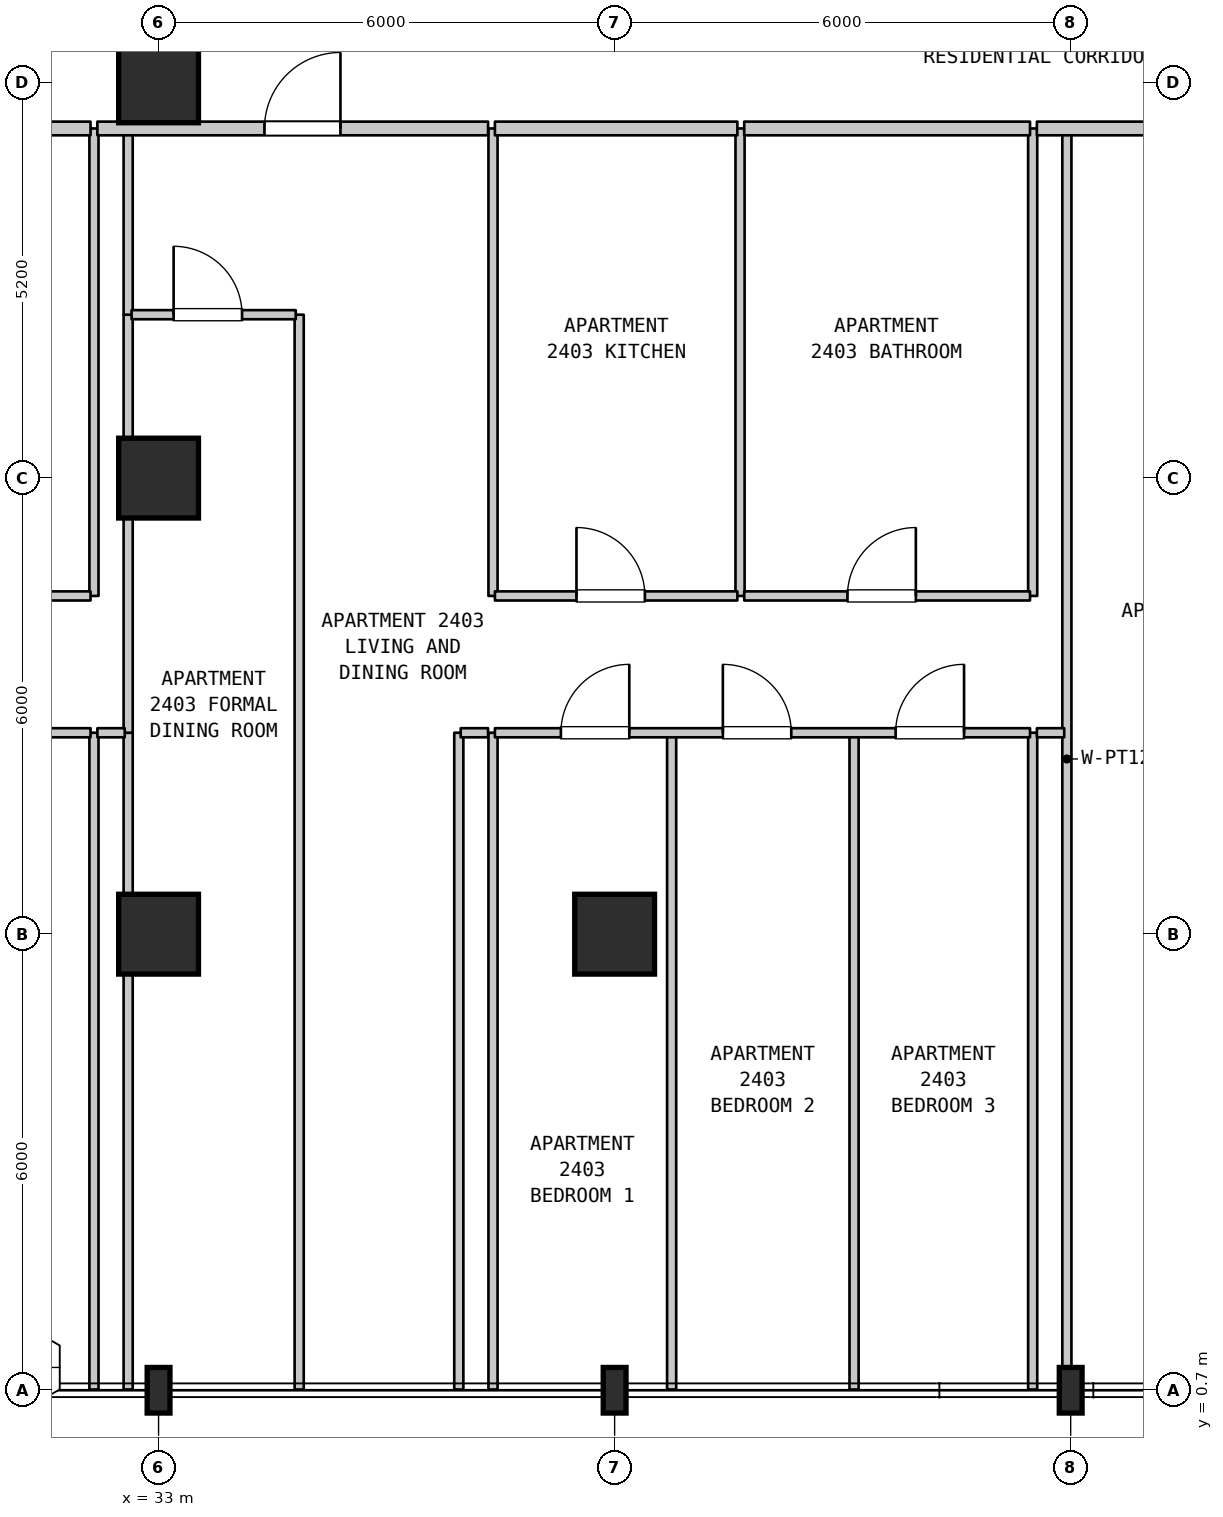
"""IFC4 building model, lengths in metres.
Left out: names, types, materials, properties, quantities, classifications, styles, units other than length and angle.
Written with IfcOpenShell. Run it as: python <this file> out.ifc"""

import sys

from ifc_helpers import new_model, si_unit, direction, frame, frame_2d, origin, origin_2d, place, context, subcontext, project, spatial, rectangle, i_section, extrude, element, fill, save


model = new_model("IFC4")
c1 = context("Model", 3, precision=1e-05, world=origin(), true_north=direction((0.0, 1.0)))
c2 = subcontext(c1, "Body", "Model", "MODEL_VIEW")
j1 = project(units=[si_unit("LENGTHUNIT", "METRE"), si_unit("PLANEANGLEUNIT", "RADIAN")], contexts=[c1])
p1 = place(None, origin())
s1 = spatial("IfcSite", under=j1, at=p1, CompositionType="ELEMENT")
p2 = place(p1, origin())
s2 = spatial("IfcBuilding", under=s1, at=p2, CompositionType="ELEMENT")
p3 = place(p2, frame((0.0, 0.0, 102.0)))
s3 = spatial("IfcBuildingStorey", under=s2, at=p3, CompositionType="ELEMENT", Elevation=102.0)
p4 = place(p3, frame((33.0, 0.7, 0.0), z_axis=(0.0, 0.0, 1.0), x_axis=(1.0, 0.0, 0.0)))
e1 = element("IfcColumn", 1, at=p4, inside=s3, PredefinedType="COLUMN", context=c2, shape_type="SweptSolid", body=[
    extrude(i_section(OverallWidth=0.3, OverallDepth=0.6, WebThickness=0.015, FlangeThickness=0.03, FilletRadius=0.027, at=origin_2d()), origin(), (0.0, 0.0, 1.0), 3.7),
])
for number, where, z_axis, x_axis in (
    (2, (33.0, 6.7, 0.0), (0.0, 0.0, 1.0), (1.0, 0.0, 0.0)),
    (3, (33.0, 12.7, 0.0), (0.0, 0.0, 1.0), (1.0, 0.0, 0.0)),
    (4, (33.0, 17.9, 0.0), (0.0, 0.0, 1.0), (1.0, 0.0, 0.0)),
):
    element("IfcColumn", number, at=place(p3, frame(where, z_axis=z_axis, x_axis=x_axis)), inside=s3, PredefinedType="COLUMN", context=c2, shape_type="SweptSolid", body=[
        extrude(rectangle(XDim=1.05, YDim=1.05, at=origin_2d()), origin(), (0.0, 0.0, 1.0), 3.7),
    ])
p5 = place(p3, frame((39.0, 0.7, 0.0), z_axis=(0.0, 0.0, 1.0), x_axis=(1.0, 0.0, 0.0)))
e5 = element("IfcColumn", 5, at=p5, inside=s3, PredefinedType="COLUMN", context=c2, shape_type="SweptSolid", body=[
    extrude(i_section(OverallWidth=0.3, OverallDepth=0.6, WebThickness=0.015, FlangeThickness=0.03, FilletRadius=0.027, at=origin_2d()), origin(), (0.0, 0.0, 1.0), 3.7),
])
p6 = place(p3, frame((39.0, 6.7, 0.0), z_axis=(0.0, 0.0, 1.0), x_axis=(1.0, 0.0, 0.0)))
e6 = element("IfcColumn", 6, at=p6, inside=s3, PredefinedType="COLUMN", context=c2, shape_type="SweptSolid", body=[
    extrude(rectangle(XDim=1.05, YDim=1.05, at=origin_2d()), origin(), (0.0, 0.0, 1.0), 3.7),
])
p7 = place(p3, frame((45.0, 0.7, 0.0), z_axis=(0.0, 0.0, 1.0), x_axis=(1.0, 0.0, 0.0)))
e7 = element("IfcColumn", 7, at=p7, inside=s3, PredefinedType="COLUMN", context=c2, shape_type="SweptSolid", body=[
    extrude(i_section(OverallWidth=0.3, OverallDepth=0.6, WebThickness=0.015, FlangeThickness=0.03, FilletRadius=0.027, at=origin_2d()), origin(), (0.0, 0.0, 1.0), 3.7),
])
p8 = place(p3, frame((32.15, 0.71, 0.0), z_axis=(0.0, 0.0, 1.0), x_axis=(0.0, 1.0, 0.0)))
e8 = element("IfcWall", 8, at=p8, inside=s3, PredefinedType="PARTITIONING", context=c2, shape_type="SweptSolid", body=[
    extrude(rectangle(XDim=8.64, YDim=0.12, at=frame_2d((4.32, 0.0))), origin(), (0.0, 0.0, 1.0), 3.385),
])
p9 = place(p3, frame((32.15, 11.15, 0.0), z_axis=(0.0, 0.0, 1.0), x_axis=(0.0, 1.0, 0.0)))
e9 = element("IfcWall", 9, at=p9, inside=s3, PredefinedType="PARTITIONING", context=c2, shape_type="SweptSolid", body=[
    extrude(rectangle(XDim=6.15, YDim=0.12, at=frame_2d((3.075, 0.0))), origin(), (0.0, 0.0, 1.0), 3.385),
])
p10 = place(p3, frame((32.6, 0.71, 0.0), z_axis=(0.0, 0.0, 1.0), x_axis=(0.0, 1.0, 0.0)))
e10 = element("IfcWall", 10, at=p10, inside=s3, PredefinedType="PARTITIONING", context=c2, shape_type="SweptSolid", body=[
    extrude(rectangle(XDim=8.64, YDim=0.12, at=frame_2d((4.32, 0.0))), origin(), (0.0, 0.0, 1.0), 3.385),
])
p11 = place(p3, frame((32.6, 9.35, 0.0), z_axis=(0.0, 0.0, 1.0), x_axis=(0.0, 1.0, 0.0)))
e11 = element("IfcWall", 11, at=p11, inside=s3, PredefinedType="PARTITIONING", context=c2, shape_type="SweptSolid", body=[
    extrude(rectangle(XDim=5.5, YDim=0.12, at=frame_2d((2.75, 0.0))), origin(), (0.0, 0.0, 1.0), 3.385),
])
p12 = place(p3, frame((32.6, 14.85, 0.0), z_axis=(0.0, 0.0, 1.0), x_axis=(0.0, 1.0, 0.0)))
e12 = element("IfcWall", 12, at=p12, inside=s3, PredefinedType="PARTITIONING", context=c2, shape_type="SweptSolid", body=[
    extrude(rectangle(XDim=2.45, YDim=0.12, at=frame_2d((1.225, 0.0))), origin(), (0.0, 0.0, 1.0), 3.385),
])
p13 = place(p3, frame((34.85, 0.71, 0.0), z_axis=(0.0, 0.0, 1.0), x_axis=(0.0, 1.0, 0.0)))
e13 = element("IfcWall", 13, at=p13, inside=s3, PredefinedType="PARTITIONING", context=c2, shape_type="SweptSolid", body=[
    extrude(rectangle(XDim=14.14, YDim=0.12, at=frame_2d((7.07, 0.0))), origin(), (0.0, 0.0, 1.0), 3.385),
])
for number, where, z_axis, x_axis in (
    (14, (36.95, 0.71, 0.0), (0.0, 0.0, 1.0), (0.0, 1.0, 0.0)),
    (15, (37.4, 0.71, 0.0), (0.0, 0.0, 1.0), (0.0, 1.0, 0.0)),
):
    element("IfcWall", number, at=place(p3, frame(where, z_axis=z_axis, x_axis=x_axis)), inside=s3, PredefinedType="PARTITIONING", context=c2, shape_type="SweptSolid", body=[
        extrude(rectangle(XDim=8.64, YDim=0.12, at=frame_2d((4.32, 0.0))), origin(), (0.0, 0.0, 1.0), 3.385),
    ])
p14 = place(p3, frame((37.4, 11.15, 0.0), z_axis=(0.0, 0.0, 1.0), x_axis=(0.0, 1.0, 0.0)))
e16 = element("IfcWall", 16, at=p14, inside=s3, PredefinedType="PARTITIONING", context=c2, shape_type="SweptSolid", body=[
    extrude(rectangle(XDim=6.15, YDim=0.12, at=frame_2d((3.075, 0.0))), origin(), (0.0, 0.0, 1.0), 3.385),
])
p15 = place(p3, frame((39.75, 0.71, 0.0), z_axis=(0.0, 0.0, 1.0), x_axis=(0.0, 1.0, 0.0)))
e17 = element("IfcWall", 17, at=p15, inside=s3, PredefinedType="PARTITIONING", context=c2, shape_type="SweptSolid", body=[
    extrude(rectangle(XDim=8.64, YDim=0.12, at=frame_2d((4.32, 0.0))), origin(), (0.0, 0.0, 1.0), 3.385),
])
p16 = place(p3, frame((40.65, 11.15, 0.0), z_axis=(0.0, 0.0, 1.0), x_axis=(0.0, 1.0, 0.0)))
e18 = element("IfcWall", 18, at=p16, inside=s3, PredefinedType="PARTITIONING", context=c2, shape_type="SweptSolid", body=[
    extrude(rectangle(XDim=6.15, YDim=0.12, at=frame_2d((3.075, 0.0))), origin(), (0.0, 0.0, 1.0), 3.385),
])
for number, where, z_axis, x_axis in (
    (19, (42.15, 0.71, 0.0), (0.0, 0.0, 1.0), (0.0, 1.0, 0.0)),
    (20, (44.5, 0.71, 0.0), (0.0, 0.0, 1.0), (0.0, 1.0, 0.0)),
):
    element("IfcWall", number, at=place(p3, frame(where, z_axis=z_axis, x_axis=x_axis)), inside=s3, PredefinedType="PARTITIONING", context=c2, shape_type="SweptSolid", body=[
        extrude(rectangle(XDim=8.64, YDim=0.12, at=frame_2d((4.32, 0.0))), origin(), (0.0, 0.0, 1.0), 3.385),
    ])
p17 = place(p3, frame((44.5, 11.15, 0.0), z_axis=(0.0, 0.0, 1.0), x_axis=(0.0, 1.0, 0.0)))
e21 = element("IfcWall", 21, at=p17, inside=s3, PredefinedType="PARTITIONING", context=c2, shape_type="SweptSolid", body=[
    extrude(rectangle(XDim=6.15, YDim=0.12, at=frame_2d((3.075, 0.0))), origin(), (0.0, 0.0, 1.0), 3.385),
])
p18 = place(p3, frame((44.95, 0.71, 0.0), z_axis=(0.0, 0.0, 1.0), x_axis=(0.0, 1.0, 0.0)))
e22 = element("IfcWall", 22, at=p18, inside=s3, PredefinedType="PARTITIONING", context=c2, shape_type="SweptSolid", body=[
    extrude(rectangle(XDim=16.59, YDim=0.12, at=frame_2d((8.295, 0.0))), origin(), (0.0, 0.0, 1.0), 3.385),
])
p19 = place(p3, frame((25.375, 9.35, 0.0), z_axis=(0.0, 0.0, 1.0), x_axis=(1.0, 0.0, 0.0)))
e23 = element("IfcWall", 23, at=p19, inside=s3, PredefinedType="PARTITIONING", context=c2, shape_type="SweptSolid", body=[
    extrude(rectangle(XDim=6.73, YDim=0.12, at=frame_2d((3.365, 0.0))), origin(), (0.0, 0.0, 1.0), 3.385),
])
p20 = place(p19, frame((1.31, 0.0, 0.0)))
e24 = element("IfcOpeningElement", 24, at=p20, cuts=e23, PredefinedType="OPENING", context=c2, shape_type="SweptSolid", body=[
    extrude(rectangle(XDim=0.9, YDim=2.15, at=frame_2d((0.45, 1.075))), frame((0.0, 0.07, 0.0), z_axis=(0.0, -1.0, 0.0), x_axis=(1.0, 0.0, 0.0)), (0.0, 0.0, 1.0), 0.14),
])
p21 = place(p19, frame((4.37, 0.0, 0.0)))
e25 = element("IfcOpeningElement", 25, at=p21, cuts=e23, PredefinedType="OPENING", context=c2, shape_type="SweptSolid", body=[
    extrude(rectangle(XDim=0.9, YDim=2.15, at=frame_2d((0.45, 1.075))), frame((0.0, 0.07, 0.0), z_axis=(0.0, -1.0, 0.0), x_axis=(1.0, 0.0, 0.0)), (0.0, 0.0, 1.0), 0.14),
])
for number, where, z_axis, x_axis in (
    (26, (32.195, 9.35, 0.0), (0.0, 0.0, 1.0), (1.0, 0.0, 0.0)),
    (27, (36.975, 9.35, 0.0), (0.0, 0.0, 1.0), (1.0, 0.0, 0.0)),
):
    element("IfcWall", number, at=place(p3, frame(where, z_axis=z_axis, x_axis=x_axis)), inside=s3, PredefinedType="PARTITIONING", context=c2, shape_type="SweptSolid", body=[
        extrude(rectangle(XDim=0.36, YDim=0.12, at=frame_2d((0.18, 0.0))), origin(), (0.0, 0.0, 1.0), 3.385),
    ])
p22 = place(p3, frame((37.425, 9.35, 0.0), z_axis=(0.0, 0.0, 1.0), x_axis=(1.0, 0.0, 0.0)))
e28 = element("IfcWall", 28, at=p22, inside=s3, PredefinedType="PARTITIONING", context=c2, shape_type="SweptSolid", body=[
    extrude(rectangle(XDim=7.04, YDim=0.12, at=frame_2d((3.52, 0.0))), origin(), (0.0, 0.0, 1.0), 3.385),
])
p23 = place(p22, frame((0.868, 0.0, 0.0)))
e29 = element("IfcOpeningElement", 29, at=p23, cuts=e28, PredefinedType="OPENING", context=c2, shape_type="SweptSolid", body=[
    extrude(rectangle(XDim=0.9, YDim=2.15, at=frame_2d((0.45, 1.075))), frame((0.0, 0.07, 0.0), z_axis=(0.0, -1.0, 0.0), x_axis=(1.0, 0.0, 0.0)), (0.0, 0.0, 1.0), 0.14),
])
p24 = place(p22, frame((2.999, 0.0, 0.0)))
e30 = element("IfcOpeningElement", 30, at=p24, cuts=e28, PredefinedType="OPENING", context=c2, shape_type="SweptSolid", body=[
    extrude(rectangle(XDim=0.9, YDim=2.15, at=frame_2d((0.45, 1.075))), frame((0.0, 0.07, 0.0), z_axis=(0.0, -1.0, 0.0), x_axis=(1.0, 0.0, 0.0)), (0.0, 0.0, 1.0), 0.14),
])
p25 = place(p22, frame((5.272, 0.0, 0.0)))
e31 = element("IfcOpeningElement", 31, at=p25, cuts=e28, PredefinedType="OPENING", context=c2, shape_type="SweptSolid", body=[
    extrude(rectangle(XDim=0.9, YDim=2.15, at=frame_2d((0.45, 1.075))), frame((0.0, 0.07, 0.0), z_axis=(0.0, -1.0, 0.0), x_axis=(1.0, 0.0, 0.0)), (0.0, 0.0, 1.0), 0.14),
])
p26 = place(p3, frame((44.555, 9.35, 0.0), z_axis=(0.0, 0.0, 1.0), x_axis=(1.0, 0.0, 0.0)))
e32 = element("IfcWall", 32, at=p26, inside=s3, PredefinedType="PARTITIONING", context=c2, shape_type="SweptSolid", body=[
    extrude(rectangle(XDim=0.36, YDim=0.12, at=frame_2d((0.18, 0.0))), origin(), (0.0, 0.0, 1.0), 3.385),
])
p27 = place(p3, frame((28.512, 11.15, 0.0), z_axis=(0.0, 0.0, 1.0), x_axis=(1.0, 0.0, 0.0)))
e33 = element("IfcWall", 33, at=p27, inside=s3, PredefinedType="PARTITIONING", context=c2, shape_type="SweptSolid", body=[
    extrude(rectangle(XDim=3.593, YDim=0.12, at=frame_2d((1.796, 0.0))), origin(), (0.0, 0.0, 1.0), 3.385),
])
p28 = place(p27, frame((1.346, 0.0, 0.0)))
e34 = element("IfcOpeningElement", 34, at=p28, cuts=e33, PredefinedType="OPENING", context=c2, shape_type="SweptSolid", body=[
    extrude(rectangle(XDim=0.9, YDim=2.1, at=frame_2d((0.45, 1.05))), frame((0.0, 0.07, 0.0), z_axis=(0.0, -1.0, 0.0), x_axis=(1.0, 0.0, 0.0)), (0.0, 0.0, 1.0), 0.14),
])
p29 = place(p3, frame((37.425, 11.15, 0.0), z_axis=(0.0, 0.0, 1.0), x_axis=(1.0, 0.0, 0.0)))
e35 = element("IfcWall", 35, at=p29, inside=s3, PredefinedType="PARTITIONING", context=c2, shape_type="SweptSolid", body=[
    extrude(rectangle(XDim=3.19, YDim=0.12, at=frame_2d((1.595, 0.0))), origin(), (0.0, 0.0, 1.0), 3.385),
])
p30 = place(p29, frame((1.073, 0.0, 0.0)))
e36 = element("IfcOpeningElement", 36, at=p30, cuts=e35, PredefinedType="OPENING", context=c2, shape_type="SweptSolid", body=[
    extrude(rectangle(XDim=0.9, YDim=2.15, at=frame_2d((0.45, 1.075))), frame((0.0, 0.07, 0.0), z_axis=(0.0, -1.0, 0.0), x_axis=(1.0, 0.0, 0.0)), (0.0, 0.0, 1.0), 0.14),
])
p31 = place(p3, frame((40.705, 11.15, 0.0), z_axis=(0.0, 0.0, 1.0), x_axis=(1.0, 0.0, 0.0)))
e37 = element("IfcWall", 37, at=p31, inside=s3, PredefinedType="PARTITIONING", context=c2, shape_type="SweptSolid", body=[
    extrude(rectangle(XDim=3.76, YDim=0.12, at=frame_2d((1.88, 0.0))), origin(), (0.0, 0.0, 1.0), 3.385),
])
p32 = place(p31, frame((1.358, 0.0, 0.0)))
e38 = element("IfcOpeningElement", 38, at=p32, cuts=e37, PredefinedType="OPENING", context=c2, shape_type="SweptSolid", body=[
    extrude(rectangle(XDim=0.9, YDim=2.1, at=frame_2d((0.45, 1.05))), frame((0.0, 0.07, 0.0), z_axis=(0.0, -1.0, 0.0), x_axis=(1.0, 0.0, 0.0)), (0.0, 0.0, 1.0), 0.14),
])
p33 = place(p3, frame((32.645, 14.85, 0.0), z_axis=(0.0, 0.0, 1.0), x_axis=(1.0, 0.0, 0.0)))
e39 = element("IfcWall", 39, at=p33, inside=s3, PredefinedType="PARTITIONING", context=c2, shape_type="SweptSolid", body=[
    extrude(rectangle(XDim=2.16, YDim=0.12, at=frame_2d((1.08, 0.0))), origin(), (0.0, 0.0, 1.0), 3.385),
])
p34 = place(p33, frame((0.553, 0.0, 0.0)))
e40 = element("IfcOpeningElement", 40, at=p34, cuts=e39, PredefinedType="OPENING", context=c2, shape_type="SweptSolid", body=[
    extrude(rectangle(XDim=0.9, YDim=2.15, at=frame_2d((0.45, 1.075))), frame((0.0, 0.07, 0.0), z_axis=(0.0, -1.0, 0.0), x_axis=(1.0, 0.0, 0.0)), (0.0, 0.0, 1.0), 0.14),
])
p35 = place(p3, frame((28.512, 17.3, 0.0), z_axis=(0.0, 0.0, 1.0), x_axis=(1.0, 0.0, 0.0)))
e41 = element("IfcWall", 41, at=p35, inside=s3, PredefinedType="STANDARD", context=c2, shape_type="SweptSolid", body=[
    extrude(rectangle(XDim=3.593, YDim=0.18, at=frame_2d((1.796, 0.0))), origin(), (0.0, 0.0, 1.0), 3.385),
])
p36 = place(p3, frame((32.195, 17.3, 0.0), z_axis=(0.0, 0.0, 1.0), x_axis=(1.0, 0.0, 0.0)))
e42 = element("IfcWall", 42, at=p36, inside=s3, PredefinedType="STANDARD", context=c2, shape_type="SweptSolid", body=[
    extrude(rectangle(XDim=5.14, YDim=0.18, at=frame_2d((2.57, 0.0))), origin(), (0.0, 0.0, 1.0), 3.385),
])
p37 = place(p36, frame((2.198, 0.0, 0.0)))
e43 = element("IfcOpeningElement", 43, at=p37, cuts=e42, PredefinedType="OPENING", context=c2, shape_type="SweptSolid", body=[
    extrude(rectangle(XDim=1.0, YDim=2.15, at=frame_2d((0.5, 1.075))), frame((0.0, 0.1, 0.0), z_axis=(0.0, -1.0, 0.0), x_axis=(1.0, 0.0, 0.0)), (0.0, 0.0, 1.0), 0.2),
])
p38 = place(p3, frame((37.425, 17.3, 0.0), z_axis=(0.0, 0.0, 1.0), x_axis=(1.0, 0.0, 0.0)))
e44 = element("IfcWall", 44, at=p38, inside=s3, PredefinedType="STANDARD", context=c2, shape_type="SweptSolid", body=[
    extrude(rectangle(XDim=3.19, YDim=0.18, at=frame_2d((1.595, 0.0))), origin(), (0.0, 0.0, 1.0), 3.385),
])
p39 = place(p3, frame((40.705, 17.3, 0.0), z_axis=(0.0, 0.0, 1.0), x_axis=(1.0, 0.0, 0.0)))
e45 = element("IfcWall", 45, at=p39, inside=s3, PredefinedType="STANDARD", context=c2, shape_type="SweptSolid", body=[
    extrude(rectangle(XDim=3.76, YDim=0.18, at=frame_2d((1.88, 0.0))), origin(), (0.0, 0.0, 1.0), 3.385),
])
p40 = place(p3, frame((44.555, 17.3, 0.0), z_axis=(0.0, 0.0, 1.0), x_axis=(1.0, 0.0, 0.0)))
e46 = element("IfcWall", 46, at=p40, inside=s3, PredefinedType="STANDARD", context=c2, shape_type="SweptSolid", body=[
    extrude(rectangle(XDim=4.97, YDim=0.18, at=frame_2d((2.485, 0.0))), origin(), (0.0, 0.0, 1.0), 3.385),
])
p41 = place(p40, frame((2.185, 0.0, 0.0)))
e47 = element("IfcOpeningElement", 47, at=p41, cuts=e46, PredefinedType="OPENING", context=c2, shape_type="SweptSolid", body=[
    extrude(rectangle(XDim=1.0, YDim=2.15, at=frame_2d((0.5, 1.075))), frame((0.0, 0.1, 0.0), z_axis=(0.0, -1.0, 0.0), x_axis=(1.0, 0.0, 0.0)), (0.0, 0.0, 1.0), 0.2),
])
p42 = place(p23, origin())
e48 = element("IfcDoor", 48, at=p42, inside=s3, OperationType="SINGLE_SWING_RIGHT", PredefinedType="DOOR", context=c2, shape_type="SweptSolid", body=[
    extrude(rectangle(XDim=0.9, YDim=2.15, at=frame_2d((0.45, 1.075))), frame((0.0, 0.025, 0.0), z_axis=(0.0, -1.0, 0.0), x_axis=(1.0, 0.0, 0.0)), (0.0, 0.0, 1.0), 0.05),
])
fill(e29, e48)
p43 = place(p24, origin())
e49 = element("IfcDoor", 49, at=p43, inside=s3, OperationType="SINGLE_SWING_LEFT", PredefinedType="DOOR", context=c2, shape_type="SweptSolid", body=[
    extrude(rectangle(XDim=0.9, YDim=2.15, at=frame_2d((0.45, 1.075))), frame((0.0, 0.025, 0.0), z_axis=(0.0, -1.0, 0.0), x_axis=(1.0, 0.0, 0.0)), (0.0, 0.0, 1.0), 0.05),
])
fill(e30, e49)
p44 = place(p25, origin())
e50 = element("IfcDoor", 50, at=p44, inside=s3, OperationType="SINGLE_SWING_RIGHT", PredefinedType="DOOR", context=c2, shape_type="SweptSolid", body=[
    extrude(rectangle(XDim=0.9, YDim=2.15, at=frame_2d((0.45, 1.075))), frame((0.0, 0.025, 0.0), z_axis=(0.0, -1.0, 0.0), x_axis=(1.0, 0.0, 0.0)), (0.0, 0.0, 1.0), 0.05),
])
fill(e31, e50)
p45 = place(p30, origin())
e51 = element("IfcDoor", 51, at=p45, inside=s3, OperationType="SINGLE_SWING_LEFT", PredefinedType="DOOR", context=c2, shape_type="SweptSolid", body=[
    extrude(rectangle(XDim=0.9, YDim=2.15, at=frame_2d((0.45, 1.075))), frame((0.0, 0.025, 0.0), z_axis=(0.0, -1.0, 0.0), x_axis=(1.0, 0.0, 0.0)), (0.0, 0.0, 1.0), 0.05),
])
fill(e36, e51)
p46 = place(p32, origin())
e52 = element("IfcDoor", 52, at=p46, inside=s3, OperationType="SINGLE_SWING_RIGHT", PredefinedType="DOOR", context=c2, shape_type="SweptSolid", body=[
    extrude(rectangle(XDim=0.9, YDim=2.1, at=frame_2d((0.45, 1.05))), frame((0.0, 0.025, 0.0), z_axis=(0.0, -1.0, 0.0), x_axis=(1.0, 0.0, 0.0)), (0.0, 0.0, 1.0), 0.05),
])
fill(e38, e52)
p47 = place(p34, origin())
e53 = element("IfcDoor", 53, at=p47, inside=s3, OperationType="SINGLE_SWING_LEFT", PredefinedType="DOOR", context=c2, shape_type="SweptSolid", body=[
    extrude(rectangle(XDim=0.9, YDim=2.15, at=frame_2d((0.45, 1.075))), frame((0.0, 0.025, 0.0), z_axis=(0.0, -1.0, 0.0), x_axis=(1.0, 0.0, 0.0)), (0.0, 0.0, 1.0), 0.05),
])
fill(e40, e53)
p48 = place(p37, origin())
e54 = element("IfcDoor", 54, at=p48, inside=s3, OperationType="SINGLE_SWING_RIGHT", PredefinedType="DOOR", context=c2, shape_type="SweptSolid", body=[
    extrude(rectangle(XDim=1.0, YDim=2.15, at=frame_2d((0.5, 1.075))), frame((0.0, 0.025, 0.0), z_axis=(0.0, -1.0, 0.0), x_axis=(1.0, 0.0, 0.0)), (0.0, 0.0, 1.0), 0.05),
])
fill(e43, e54)
save(model, sys.argv[1])
